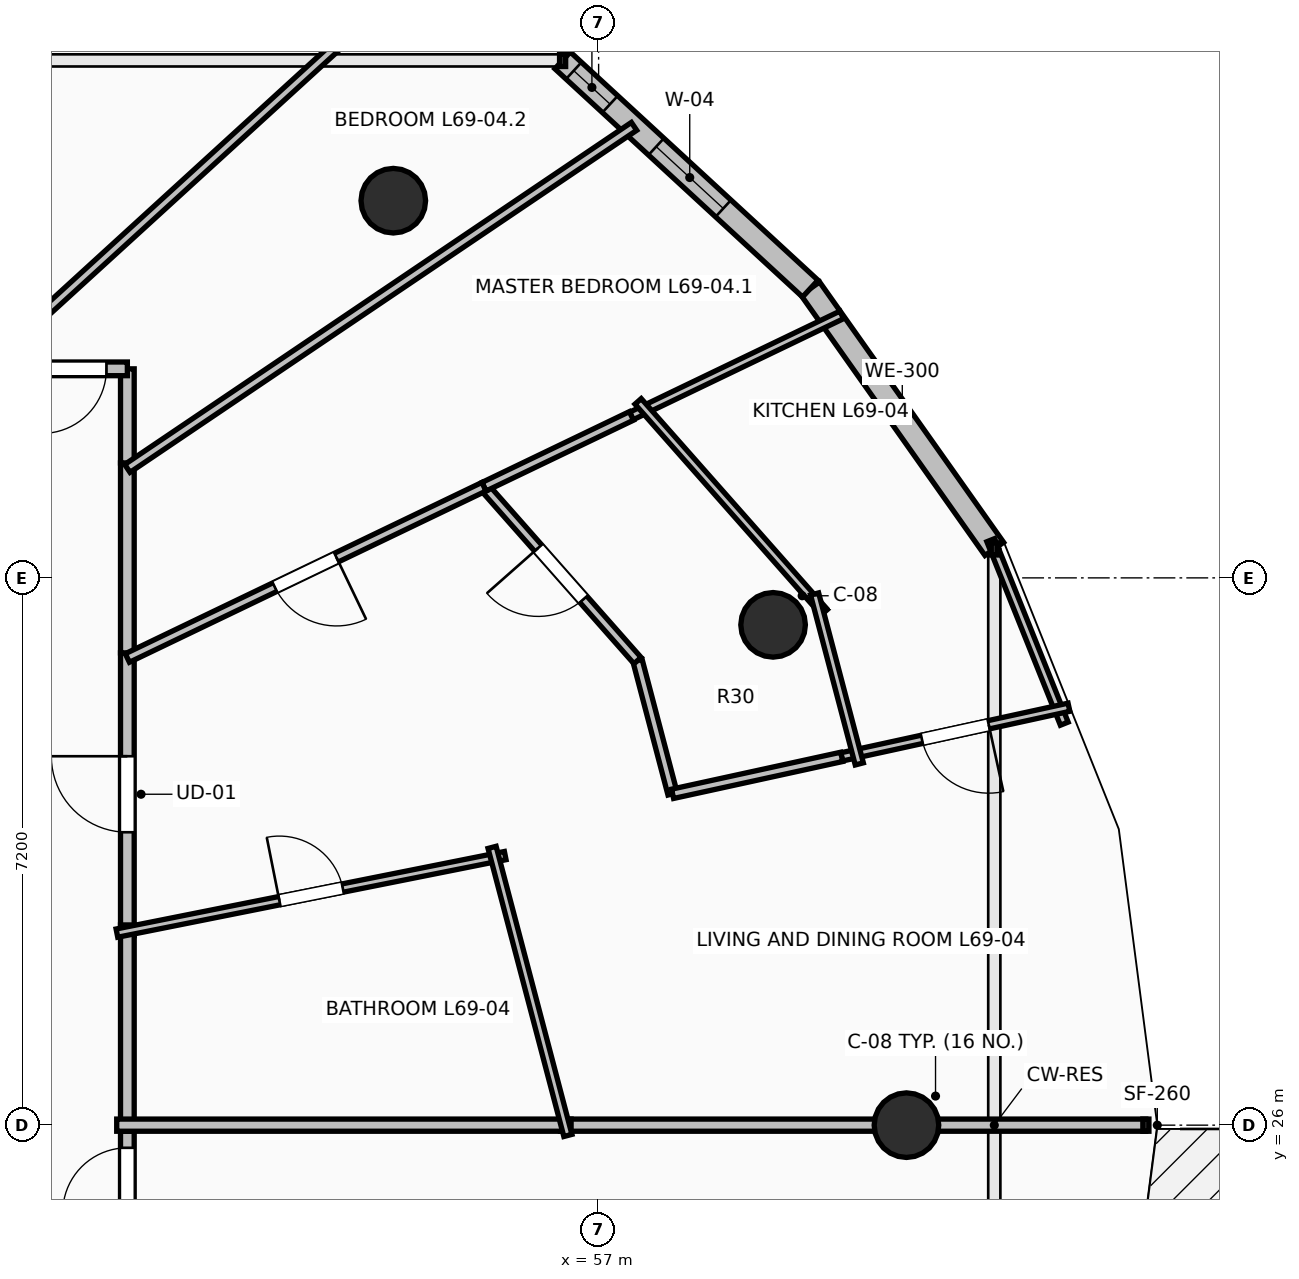
"""IFC4 building model, lengths in metres.
Left out: names, types, materials, properties, quantities, classifications, styles, units other than length and angle.
Written with IfcOpenShell. Run it as: python <this file> out.ifc"""

import sys

from ifc_helpers import new_model, si_unit, direction, frame, frame_2d, origin, origin_2d, place, context, subcontext, project, spatial, rectangle, circle, extrude, element, fill, save


model = new_model("IFC4")
c1 = context("Model", 3, precision=1e-05, world=origin(), true_north=direction((0.0, 1.0)))
c2 = subcontext(c1, "Body", "Model", "MODEL_VIEW")
j1 = project(units=[si_unit("LENGTHUNIT", "METRE"), si_unit("PLANEANGLEUNIT", "RADIAN")], contexts=[c1])
p1 = place(None, origin())
s1 = spatial("IfcSite", under=j1, at=p1, CompositionType="ELEMENT")
p2 = place(p1, origin())
s2 = spatial("IfcBuilding", under=s1, at=p2, CompositionType="ELEMENT")
p3 = place(p2, frame((0.0, 0.0, 255.55)))
s3 = spatial("IfcBuildingStorey", under=s2, at=p3, CompositionType="ELEMENT", Elevation=255.55)
for number, where, z_axis, x_axis in (
    (1, (61.05, 26.0, 0.0), (0.0, 0.0, 1.0), (1.0, 0.0, 0.0)),
    (2, (59.295, 32.582, 0.0), (0.0, 0.0, 1.0), (0.924, 0.383, 0.0)),
    (3, (54.299, 38.162, 0.0), (0.0, 0.0, 1.0), (0.707, 0.707, 0.0)),
):
    element("IfcColumn", number, at=place(p3, frame(where, z_axis=z_axis, x_axis=x_axis)), inside=s3, PredefinedType="COLUMN", context=c2, shape_type="SweptSolid", body=[
        extrude(circle(Radius=0.425, at=origin_2d()), origin(), (0.0, 0.0, 1.0), 3.55),
    ])
p4 = place(p3, frame((62.206, 33.581, 0.0), z_axis=(0.0, 0.0, 1.0), x_axis=(-0.577261247247, 0.816559521668, 0.0)))
e4 = element("IfcWall", 4, at=p4, inside=s3, PredefinedType="STANDARD", context=c2, shape_type="SweptSolid", body=[
    extrude(rectangle(XDim=4.194, YDim=0.3, at=frame_2d((2.097, 0.0))), origin(), (0.0, 0.0, 1.0), 3.29),
])
p5 = place(p3, frame((59.784, 37.006, 0.0), z_axis=(0.0, 0.0, 1.0), x_axis=(-0.735445373611, 0.677584018727, 0.0)))
e5 = element("IfcWall", 5, at=p5, inside=s3, PredefinedType="STANDARD", context=c2, shape_type="SweptSolid", body=[
    extrude(rectangle(XDim=4.43, YDim=0.3, at=frame_2d((2.215, 0.0))), origin(), (0.0, 0.0, 1.0), 3.29),
])
p6 = place(p5, frame((1.556, 0.0, 0.85)))
e6 = element("IfcOpeningElement", 6, at=p6, cuts=e5, PredefinedType="OPENING", context=c2, shape_type="SweptSolid", body=[
    extrude(rectangle(XDim=1.2, YDim=1.95, at=frame_2d((0.6, 0.975))), frame((0.0, 0.165, 0.0), z_axis=(0.0, -1.0, 0.0), x_axis=(1.0, 0.0, 0.0)), (0.0, 0.0, 1.0), 0.33),
])
p7 = place(p5, frame((3.581, 0.0, 0.85)))
e7 = element("IfcOpeningElement", 7, at=p7, cuts=e5, PredefinedType="OPENING", context=c2, shape_type="SweptSolid", body=[
    extrude(rectangle(XDim=0.65, YDim=1.8, at=frame_2d((0.325, 0.9))), frame((0.0, 0.165, 0.0), z_axis=(0.0, -1.0, 0.0), x_axis=(1.0, 0.0, 0.0)), (0.0, 0.0, 1.0), 0.33),
])
p8 = place(p3, frame((50.8, 24.494, 0.0), z_axis=(0.0, 0.0, 1.0), x_axis=(0.0, 1.0, 0.0)))
e8 = element("IfcWall", 8, at=p8, inside=s3, PredefinedType="PARTITIONING", context=c2, shape_type="SweptSolid", body=[
    extrude(rectangle(XDim=1.566, YDim=0.18, at=frame_2d((0.783, 0.0))), origin(), (0.0, 0.0, 1.0), 3.29),
])
p9 = place(p8, frame((0.358, 0.0, 0.0)))
e9 = element("IfcOpeningElement", 9, at=p9, cuts=e8, PredefinedType="OPENING", context=c2, shape_type="SweptSolid", body=[
    extrude(rectangle(XDim=0.85, YDim=2.1, at=frame_2d((0.425, 1.05))), frame((0.0, 0.105, 0.0), z_axis=(0.0, -1.0, 0.0), x_axis=(1.0, 0.0, 0.0)), (0.0, 0.0, 1.0), 0.21),
])
p10 = place(p3, frame((50.8, 28.494, 0.0), z_axis=(0.0, 0.0, 1.0), x_axis=(0.0, 1.0, 0.0)))
e10 = element("IfcWall", 10, at=p10, inside=s3, PredefinedType="PARTITIONING", context=c2, shape_type="SweptSolid", body=[
    extrude(rectangle(XDim=3.719, YDim=0.18, at=frame_2d((1.859, 0.0))), origin(), (0.0, 0.0, 1.0), 3.29),
])
p11 = place(p10, frame((1.36, 0.0, 0.0)))
e11 = element("IfcOpeningElement", 11, at=p11, cuts=e10, PredefinedType="OPENING", context=c2, shape_type="SweptSolid", body=[
    extrude(rectangle(XDim=1.0, YDim=2.15, at=frame_2d((0.5, 1.075))), frame((0.0, 0.105, 0.0), z_axis=(0.0, -1.0, 0.0), x_axis=(1.0, 0.0, 0.0)), (0.0, 0.0, 1.0), 0.21),
])
p12 = place(p3, frame((50.8, 25.92, 0.0), z_axis=(0.0, 0.0, 1.0), x_axis=(0.0, 1.0, 0.0)))
e12 = element("IfcWall", 12, at=p12, inside=s3, PredefinedType="PARTITIONING", context=c2, shape_type="SweptSolid", body=[
    extrude(rectangle(XDim=2.714, YDim=0.18, at=frame_2d((1.357, 0.0))), origin(), (0.0, 0.0, 1.0), 2.482),
])
p13 = place(p3, frame((50.8, 32.213, 0.0), z_axis=(0.0, 0.0, 1.0), x_axis=(0.0, 1.0, 0.0)))
e13 = element("IfcWall", 13, at=p13, inside=s3, PredefinedType="PARTITIONING", context=c2, shape_type="SweptSolid", body=[
    extrude(rectangle(XDim=2.499, YDim=0.18, at=frame_2d((1.25, 0.0))), origin(), (0.0, 0.0, 1.0), 2.482),
])
p14 = place(p3, frame((50.8, 34.712, 0.0), z_axis=(0.0, 0.0, 1.0), x_axis=(0.0, 1.0, 0.0)))
e14 = element("IfcWall", 14, at=p14, inside=s3, PredefinedType="PARTITIONING", context=c2, shape_type="SweptSolid", body=[
    extrude(rectangle(XDim=1.238, YDim=0.18, at=frame_2d((0.619, 0.0))), origin(), (0.0, 0.0, 1.0), 2.482),
])
p15 = place(p3, frame((50.8, 35.95, 0.0), z_axis=(0.0, 0.0, 1.0), x_axis=(-1.0, 0.0, 0.0)))
e15 = element("IfcWall", 15, at=p15, inside=s3, PredefinedType="PARTITIONING", context=c2, shape_type="SweptSolid", body=[
    extrude(rectangle(XDim=1.96, YDim=0.18, at=frame_2d((0.98, 0.0))), origin(), (0.0, 0.0, 1.0), 2.936),
])
p16 = place(p15, frame((0.275, 0.0, 0.0)))
e16 = element("IfcOpeningElement", 16, at=p16, cuts=e15, PredefinedType="OPENING", context=c2, shape_type="SweptSolid", body=[
    extrude(rectangle(XDim=0.85, YDim=2.1, at=frame_2d((0.425, 1.05))), frame((0.0, 0.105, 0.0), z_axis=(0.0, -1.0, 0.0), x_axis=(1.0, 0.0, 0.0)), (0.0, 0.0, 1.0), 0.21),
])
p17 = place(p3, frame((64.199, 26.0, 0.0), z_axis=(0.0, 0.0, 1.0), x_axis=(-1.0, 0.0, 0.0)))
e17 = element("IfcWall", 17, at=p17, inside=s3, PredefinedType="PARTITIONING", context=c2, shape_type="SweptSolid", body=[
    extrude(rectangle(XDim=7.701, YDim=0.16, at=frame_2d((3.851, 0.0))), origin(), (0.0, 0.0, 1.0), 2.482),
])
p18 = place(p3, frame((56.638, 26.0, 0.0), z_axis=(0.0, 0.0, 1.0), x_axis=(-1.0, 0.0, 0.0)))
e18 = element("IfcWall", 18, at=p18, inside=s3, PredefinedType="PARTITIONING", context=c2, shape_type="SweptSolid", body=[
    extrude(rectangle(XDim=5.978, YDim=0.16, at=frame_2d((2.989, 0.0))), origin(), (0.0, 0.0, 1.0), 2.482),
])
p19 = place(p3, frame((50.663, 28.527, 0.0), z_axis=(0.0, 0.0, 1.0), x_axis=(0.980652709614, 0.195755620935, 0.0)))
e19 = element("IfcWall", 19, at=p19, inside=s3, PredefinedType="PARTITIONING", context=c2, shape_type="SweptSolid", body=[
    extrude(rectangle(XDim=5.209, YDim=0.11, at=frame_2d((2.605, 0.0))), origin(), (0.0, 0.0, 1.0), 2.936),
])
p20 = place(p19, frame((2.18, 0.0, 0.0)))
e20 = element("IfcOpeningElement", 20, at=p20, cuts=e19, PredefinedType="OPENING", context=c2, shape_type="SweptSolid", body=[
    extrude(rectangle(XDim=0.85, YDim=2.1, at=frame_2d((0.425, 1.05))), frame((0.0, 0.07, 0.0), z_axis=(0.0, -1.0, 0.0), x_axis=(1.0, 0.0, 0.0)), (0.0, 0.0, 1.0), 0.14),
])
p21 = place(p3, frame((55.598, 29.654, 0.0), z_axis=(0.0, 0.0, 1.0), x_axis=(0.25449329928, -0.967074537263, 0.0)))
e21 = element("IfcWall", 21, at=p21, inside=s3, PredefinedType="PARTITIONING", context=c2, shape_type="SweptSolid", body=[
    extrude(rectangle(XDim=3.919, YDim=0.11, at=frame_2d((1.959, 0.0))), origin(), (0.0, 0.0, 1.0), 2.482),
])
p22 = place(p3, frame((57.432, 35.33, 0.0), z_axis=(0.0, 0.0, 1.0), x_axis=(0.90133305384, 0.43312668592, 0.0)))
e22 = element("IfcWall", 22, at=p22, inside=s3, PredefinedType="PARTITIONING", context=c2, shape_type="SweptSolid", body=[
    extrude(rectangle(XDim=3.069, YDim=0.11, at=frame_2d((1.535, 0.0))), origin(), (0.0, 0.0, 1.0), 3.29),
])
p23 = place(p3, frame((63.126, 31.282, 0.0), z_axis=(0.0, 0.0, 1.0), x_axis=(-0.371940924939, 0.92825640227, 0.0)))
e23 = element("IfcWall", 23, at=p23, inside=s3, PredefinedType="PARTITIONING", context=c2, shape_type="SweptSolid", body=[
    extrude(rectangle(XDim=2.601, YDim=0.11, at=frame_2d((1.3, 0.0))), origin(), (0.0, 0.0, 1.0), 3.29),
])
p24 = place(p3, frame((63.188, 31.498, 0.0), z_axis=(0.0, 0.0, 1.0), x_axis=(-0.976993096252, -0.213270930688, 0.0)))
e24 = element("IfcWall", 24, at=p24, inside=s3, PredefinedType="PARTITIONING", context=c2, shape_type="SweptSolid", body=[
    extrude(rectangle(XDim=3.06, YDim=0.11, at=frame_2d((1.53, 0.0))), origin(), (0.0, 0.0, 1.0), 3.29),
])
p25 = place(p24, frame((1.08, 0.0, 0.0)))
e25 = element("IfcOpeningElement", 25, at=p25, cuts=e24, PredefinedType="OPENING", context=c2, shape_type="SweptSolid", body=[
    extrude(rectangle(XDim=0.9, YDim=2.1, at=frame_2d((0.45, 1.05))), frame((0.0, 0.07, 0.0), z_axis=(0.0, -1.0, 0.0), x_axis=(1.0, 0.0, 0.0)), (0.0, 0.0, 1.0), 0.14),
])
p26 = place(p3, frame((57.973, 30.359, 0.0), z_axis=(0.0, 0.0, 1.0), x_axis=(-0.254274526126, 0.967132082687, 0.0)))
e26 = element("IfcWall", 26, at=p26, inside=s3, PredefinedType="PARTITIONING", context=c2, shape_type="SweptSolid", body=[
    extrude(rectangle(XDim=1.813, YDim=0.125, at=frame_2d((0.906, 0.0))), origin(), (0.0, 0.0, 1.0), 3.29),
])
p27 = place(p3, frame((57.512, 32.112, 0.0), z_axis=(0.0, 0.0, 1.0), x_axis=(-0.662026430628, 0.749480490173, 0.0)))
e27 = element("IfcWall", 27, at=p27, inside=s3, PredefinedType="PARTITIONING", context=c2, shape_type="SweptSolid", body=[
    extrude(rectangle(XDim=3.051, YDim=0.125, at=frame_2d((1.526, 0.0))), origin(), (0.0, 0.0, 1.0), 2.482),
])
p28 = place(p27, frame((1.076, 0.0, 0.0)))
e28 = element("IfcOpeningElement", 28, at=p28, cuts=e27, PredefinedType="OPENING", context=c2, shape_type="SweptSolid", body=[
    extrude(rectangle(XDim=0.9, YDim=2.1, at=frame_2d((0.45, 1.05))), frame((0.0, 0.077, 0.0), z_axis=(0.0, -1.0, 0.0), x_axis=(1.0, 0.0, 0.0)), (0.0, 0.0, 1.0), 0.155),
])
p29 = place(p3, frame((55.492, 34.399, 0.0), z_axis=(0.0, 0.0, 1.0), x_axis=(0.901372521065, 0.433044545363, 0.0)))
e29 = element("IfcWall", 29, at=p29, inside=s3, PredefinedType="PARTITIONING", context=c2, shape_type="SweptSolid", body=[
    extrude(rectangle(XDim=2.152, YDim=0.125, at=frame_2d((1.076, 0.0))), origin(), (0.0, 0.0, 1.0), 2.874),
])
p30 = place(p3, frame((60.198, 30.845, 0.0), z_axis=(0.0, 0.0, 1.0), x_axis=(-0.976965000645, -0.213399595862, 0.0)))
e30 = element("IfcWall", 30, at=p30, inside=s3, PredefinedType="PARTITIONING", context=c2, shape_type="SweptSolid", body=[
    extrude(rectangle(XDim=2.278, YDim=0.125, at=frame_2d((1.139, 0.0))), origin(), (0.0, 0.0, 1.0), 2.874),
])
p31 = place(p3, frame((55.492, 34.399, 0.0), z_axis=(0.0, 0.0, 1.0), x_axis=(-0.901416162018, -0.432953695968, 0.0)))
e31 = element("IfcWall", 31, at=p31, inside=s3, PredefinedType="PARTITIONING", context=c2, shape_type="SweptSolid", body=[
    extrude(rectangle(XDim=5.205, YDim=0.125, at=frame_2d((2.603, 0.0))), origin(), (0.0, 0.0, 1.0), 2.482),
])
p32 = place(p31, frame((2.152, 0.0, 0.0)))
e32 = element("IfcOpeningElement", 32, at=p32, cuts=e31, PredefinedType="OPENING", context=c2, shape_type="SweptSolid", body=[
    extrude(rectangle(XDim=0.9, YDim=2.1, at=frame_2d((0.45, 1.05))), frame((0.0, 0.077, 0.0), z_axis=(0.0, -1.0, 0.0), x_axis=(1.0, 0.0, 0.0)), (0.0, 0.0, 1.0), 0.155),
])
p33 = place(p3, frame((57.519, 35.522, 0.0), z_axis=(0.0, 0.0, 1.0), x_axis=(0.662055665853, -0.749454665281, 0.0)))
e33 = element("IfcWall", 33, at=p33, inside=s3, PredefinedType="PARTITIONING", context=c2, shape_type="SweptSolid", body=[
    extrude(rectangle(XDim=3.701, YDim=0.11, at=frame_2d((1.851, 0.0))), origin(), (0.0, 0.0, 1.0), 3.29),
])
p34 = place(p3, frame((59.841, 32.988, 0.0), z_axis=(0.0, 0.0, 1.0), x_axis=(0.254519291204, -0.967067696909, 0.0)))
e34 = element("IfcWall", 34, at=p34, inside=s3, PredefinedType="PARTITIONING", context=c2, shape_type="SweptSolid", body=[
    extrude(rectangle(XDim=2.312, YDim=0.11, at=frame_2d((1.156, 0.0))), origin(), (0.0, 0.0, 1.0), 3.29),
])
p35 = place(p3, frame((57.466, 39.14, 0.0), z_axis=(0.0, 0.0, 1.0), x_axis=(-0.828823335801, -0.559510391352, 0.0)))
e35 = element("IfcWall", 35, at=p35, inside=s3, PredefinedType="PARTITIONING", context=c2, shape_type="SweptSolid", body=[
    extrude(rectangle(XDim=8.043, YDim=0.125, at=frame_2d((4.021, 0.0))), origin(), (0.0, 0.0, 1.0), 2.482),
])
p36 = place(p3, frame((54.631, 41.181, 0.0), z_axis=(0.0, 0.0, 1.0), x_axis=(-0.73860604902, -0.674137303783, 0.0)))
e36 = element("IfcWall", 36, at=p36, inside=s3, PredefinedType="PARTITIONING", context=c2, shape_type="SweptSolid", body=[
    extrude(rectangle(XDim=7.76, YDim=0.125, at=frame_2d((3.88, 0.0))), origin(), (0.0, 0.0, 1.0), 2.874),
])
p37 = place(p3, frame((51.725, 42.804, 0.0), z_axis=(0.0, 0.0, 1.0), x_axis=(-0.632582563989, -0.774492930721, 0.0)))
e37 = element("IfcWall", 37, at=p37, inside=s3, PredefinedType="PARTITIONING", context=c2, shape_type="SweptSolid", body=[
    extrude(rectangle(XDim=8.85, YDim=0.125, at=frame_2d((4.425, 0.0))), origin(), (0.0, 0.0, 1.0), 2.482),
])
p38 = place(p6, origin())
e38 = element("IfcWindow", 38, at=p38, inside=s3, PartitioningType="SINGLE_PANEL", PredefinedType="WINDOW", context=c2, shape_type="SweptSolid", body=[
    extrude(rectangle(XDim=1.2, YDim=1.95, at=frame_2d((0.6, 0.975))), frame((0.0, 0.03, 0.0), z_axis=(0.0, -1.0, 0.0), x_axis=(1.0, 0.0, 0.0)), (0.0, 0.0, 1.0), 0.06),
])
fill(e6, e38)
p39 = place(p7, origin())
e39 = element("IfcWindow", 39, at=p39, inside=s3, PartitioningType="SINGLE_PANEL", PredefinedType="WINDOW", context=c2, shape_type="SweptSolid", body=[
    extrude(rectangle(XDim=0.65, YDim=1.8, at=frame_2d((0.325, 0.9))), frame((0.0, 0.03, 0.0), z_axis=(0.0, -1.0, 0.0), x_axis=(1.0, 0.0, 0.0)), (0.0, 0.0, 1.0), 0.06),
])
fill(e7, e39)
p40 = place(p11, origin())
e40 = element("IfcDoor", 40, at=p40, inside=s3, OperationType="SINGLE_SWING_RIGHT", PredefinedType="DOOR", context=c2, shape_type="SweptSolid", body=[
    extrude(rectangle(XDim=1.0, YDim=2.15, at=frame_2d((0.5, 1.075))), frame((0.0, 0.025, 0.0), z_axis=(0.0, -1.0, 0.0), x_axis=(1.0, 0.0, 0.0)), (0.0, 0.0, 1.0), 0.05),
])
fill(e11, e40)
p41 = place(p20, origin())
e41 = element("IfcDoor", 41, at=p41, inside=s3, OperationType="SINGLE_SWING_LEFT", PredefinedType="DOOR", context=c2, shape_type="SweptSolid", body=[
    extrude(rectangle(XDim=0.85, YDim=2.1, at=frame_2d((0.425, 1.05))), frame((0.0, 0.025, 0.0), z_axis=(0.0, -1.0, 0.0), x_axis=(1.0, 0.0, 0.0)), (0.0, 0.0, 1.0), 0.05),
])
fill(e20, e41)
p42 = place(p25, origin())
e42 = element("IfcDoor", 42, at=p42, inside=s3, OperationType="SINGLE_SWING_LEFT", PredefinedType="DOOR", context=c2, shape_type="SweptSolid", body=[
    extrude(rectangle(XDim=0.9, YDim=2.1, at=frame_2d((0.45, 1.05))), frame((0.0, 0.025, 0.0), z_axis=(0.0, -1.0, 0.0), x_axis=(1.0, 0.0, 0.0)), (0.0, 0.0, 1.0), 0.05),
])
fill(e25, e42)
p43 = place(p28, origin())
e43 = element("IfcDoor", 43, at=p43, inside=s3, OperationType="SINGLE_SWING_RIGHT", PredefinedType="DOOR", context=c2, shape_type="SweptSolid", body=[
    extrude(rectangle(XDim=0.9, YDim=2.1, at=frame_2d((0.45, 1.05))), frame((0.0, 0.025, 0.0), z_axis=(0.0, -1.0, 0.0), x_axis=(1.0, 0.0, 0.0)), (0.0, 0.0, 1.0), 0.05),
])
fill(e28, e43)
p44 = place(p32, origin())
e44 = element("IfcDoor", 44, at=p44, inside=s3, OperationType="SINGLE_SWING_LEFT", PredefinedType="DOOR", context=c2, shape_type="SweptSolid", body=[
    extrude(rectangle(XDim=0.9, YDim=2.1, at=frame_2d((0.45, 1.05))), frame((0.0, 0.025, 0.0), z_axis=(0.0, -1.0, 0.0), x_axis=(1.0, 0.0, 0.0)), (0.0, 0.0, 1.0), 0.05),
])
fill(e32, e44)
p45 = place(p9, origin())
e45 = element("IfcDoor", 45, at=p45, inside=s3, OperationType="SINGLE_SWING_LEFT", PredefinedType="DOOR", context=c2, shape_type="SweptSolid", body=[
    extrude(rectangle(XDim=0.85, YDim=2.1, at=frame_2d((0.425, 1.05))), frame((0.0, 0.025, 0.0), z_axis=(0.0, -1.0, 0.0), x_axis=(1.0, 0.0, 0.0)), (0.0, 0.0, 1.0), 0.05),
])
fill(e9, e45)
p46 = place(p16, origin())
e46 = element("IfcDoor", 46, at=p46, inside=s3, OperationType="SINGLE_SWING_RIGHT", PredefinedType="DOOR", context=c2, shape_type="SweptSolid", body=[
    extrude(rectangle(XDim=0.85, YDim=2.1, at=frame_2d((0.425, 1.05))), frame((0.0, 0.025, 0.0), z_axis=(0.0, -1.0, 0.0), x_axis=(1.0, 0.0, 0.0)), (0.0, 0.0, 1.0), 0.05),
])
fill(e16, e46)
save(model, sys.argv[1])
